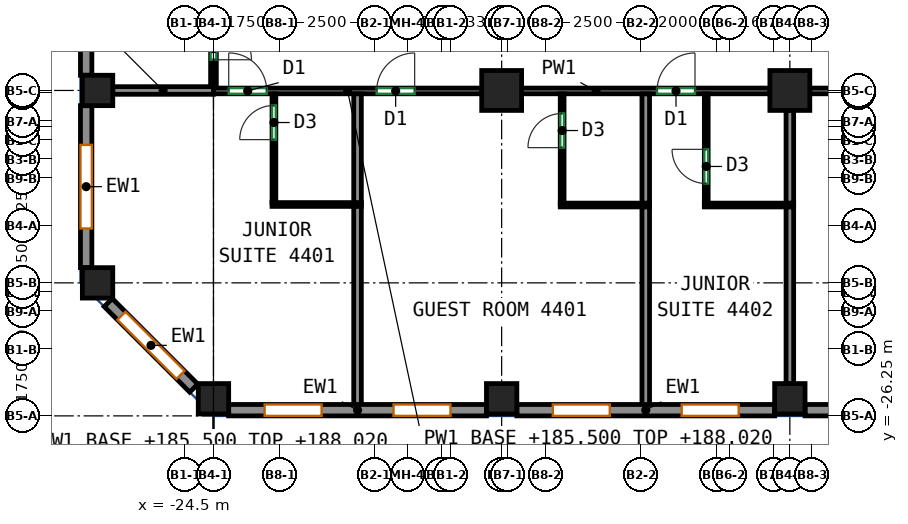
"""IFC4 building model, lengths in metres.
Left out: names, types, materials, properties, quantities, classifications, styles, units other than length and angle.
Written with IfcOpenShell. Run it as: python <this file> out.ifc"""

import sys

from ifc_helpers import new_model, si_unit, direction, frame, frame_2d, origin, origin_2d, place, context, subcontext, project, spatial, rectangle, extrude, source, transform, mapped, element, fill, save


model = new_model("IFC4")
c1 = context("Model", 3, precision=1e-05, world=origin(), true_north=direction((0.0, 1.0)))
c2 = subcontext(c1, "Body", "Model", "MODEL_VIEW")
j1 = project(units=[si_unit("LENGTHUNIT", "METRE"), si_unit("PLANEANGLEUNIT", "RADIAN")], contexts=[c1])
p1 = place(None, origin())
s1 = spatial("IfcSite", under=j1, at=p1, CompositionType="ELEMENT")
p2 = place(p1, origin())
s2 = spatial("IfcBuilding", under=s1, at=p2, CompositionType="ELEMENT")
p3 = place(p2, frame((0.0, 0.0, 185.5)))
s3 = spatial("IfcBuildingStorey", under=s2, at=p3, CompositionType="ELEMENT", Elevation=185.5)
m1 = source(origin(), c2, "Body", "SweptSolid", [
    extrude(rectangle(XDim=0.8, YDim=0.8, at=origin_2d()), origin(), (0.0, 0.0, 1.0), 3.12),
])
for number, where, z_axis, x_axis in (
    (1, (-26.8, -22.75, 0.0), (0.0, 0.0, 1.0), (1.0, 0.0, 0.0)),
    (2, (-26.8, -17.688, 0.0), (0.0, 0.0, 1.0), (1.0, 0.0, 0.0)),
    (3, (-23.75, -25.8, 0.0), (0.0, 0.0, 1.0), (1.0, 0.0, 0.0)),
    (4, (-16.167, -25.8, 0.0), (0.0, 0.0, 1.0), (1.0, 0.0, 0.0)),
):
    element("IfcColumn", number, at=place(p3, frame(where, z_axis=z_axis, x_axis=x_axis)), inside=s3, PredefinedType="COLUMN", context=c2, shape_type="MappedRepresentation", body=[
        mapped(m1, transform((0.0, 0.0, 0.0))),
    ])
m2 = source(origin(), c2, "Body", "SweptSolid", [
    extrude(rectangle(XDim=1.05, YDim=1.05, at=origin_2d()), origin(), (0.0, 0.0, 1.0), 3.12),
])
p4 = place(p3, frame((-16.167, -17.688, 0.0), z_axis=(0.0, 0.0, 1.0), x_axis=(1.0, 0.0, 0.0)))
e5 = element("IfcColumn", 5, at=p4, inside=s3, PredefinedType="COLUMN", context=c2, shape_type="MappedRepresentation", body=[
    mapped(m2, transform((0.0, 0.0, 0.0))),
])
p5 = place(p3, frame((-8.583, -25.8, 0.0), z_axis=(0.0, 0.0, 1.0), x_axis=(1.0, 0.0, 0.0)))
e6 = element("IfcColumn", 6, at=p5, inside=s3, PredefinedType="COLUMN", context=c2, shape_type="MappedRepresentation", body=[
    mapped(m1, transform((0.0, 0.0, 0.0))),
])
p6 = place(p3, frame((-8.583, -17.688, 0.0), z_axis=(0.0, 0.0, 1.0), x_axis=(1.0, 0.0, 0.0)))
e7 = element("IfcColumn", 7, at=p6, inside=s3, PredefinedType="COLUMN", context=c2, shape_type="MappedRepresentation", body=[
    mapped(m2, transform((0.0, 0.0, 0.0))),
])
m3 = source(origin(), c2, "Body", "SweptSolid", [
    extrude(rectangle(XDim=6.783, YDim=0.3, at=frame_2d((3.392, 0.0))), origin(), (0.0, 0.0, 1.0), 3.12),
])
p7 = place(p3, frame((-23.35, -26.1, 0.0), z_axis=(0.0, 0.0, 1.0), x_axis=(1.0, 0.0, 0.0)))
e8 = element("IfcWall", 8, at=p7, inside=s3, PredefinedType="SOLIDWALL", context=c2, shape_type="MappedRepresentation", body=[
    mapped(m3, transform((0.0, 0.0, 0.0))),
])
p8 = place(p7, frame((0.946, 0.0, 0.85)))
e9 = element("IfcOpeningElement", 9, at=p8, cuts=e8, PredefinedType="OPENING", context=c2, shape_type="SweptSolid", body=[
    extrude(rectangle(XDim=1.5, YDim=1.95, at=frame_2d((0.75, 0.975))), frame((0.0, 0.16, 0.0), z_axis=(0.0, -1.0, 0.0), x_axis=(1.0, 0.0, 0.0)), (0.0, 0.0, 1.0), 0.32),
])
p9 = place(p7, frame((4.337, 0.0, 0.85)))
e10 = element("IfcOpeningElement", 10, at=p9, cuts=e8, PredefinedType="OPENING", context=c2, shape_type="SweptSolid", body=[
    extrude(rectangle(XDim=1.5, YDim=1.95, at=frame_2d((0.75, 0.975))), frame((0.0, 0.16, 0.0), z_axis=(0.0, -1.0, 0.0), x_axis=(1.0, 0.0, 0.0)), (0.0, 0.0, 1.0), 0.32),
])
m4 = source(origin(), c2, "Body", "SweptSolid", [
    extrude(rectangle(XDim=6.783, YDim=0.3, at=frame_2d((3.392, 0.0))), origin(), (0.0, 0.0, 1.0), 3.12),
])
p10 = place(p3, frame((-15.767, -26.1, 0.0), z_axis=(0.0, 0.0, 1.0), x_axis=(1.0, 0.0, 0.0)))
e11 = element("IfcWall", 11, at=p10, inside=s3, PredefinedType="SOLIDWALL", context=c2, shape_type="MappedRepresentation", body=[
    mapped(m4, transform((0.0, 0.0, 0.0))),
])
p11 = place(p10, frame((0.946, 0.0, 0.85)))
e12 = element("IfcOpeningElement", 12, at=p11, cuts=e11, PredefinedType="OPENING", context=c2, shape_type="SweptSolid", body=[
    extrude(rectangle(XDim=1.5, YDim=1.95, at=frame_2d((0.75, 0.975))), frame((0.0, 0.16, 0.0), z_axis=(0.0, -1.0, 0.0), x_axis=(1.0, 0.0, 0.0)), (0.0, 0.0, 1.0), 0.32),
])
p12 = place(p10, frame((4.338, 0.0, 0.85)))
e13 = element("IfcOpeningElement", 13, at=p12, cuts=e11, PredefinedType="OPENING", context=c2, shape_type="SweptSolid", body=[
    extrude(rectangle(XDim=1.5, YDim=1.95, at=frame_2d((0.75, 0.975))), frame((0.0, 0.16, 0.0), z_axis=(0.0, -1.0, 0.0), x_axis=(1.0, 0.0, 0.0)), (0.0, 0.0, 1.0), 0.32),
])
p13 = place(p3, frame((-8.183, -26.1, 0.0), z_axis=(0.0, 0.0, 1.0), x_axis=(1.0, 0.0, 0.0)))
e14 = element("IfcWall", 14, at=p13, inside=s3, PredefinedType="SOLIDWALL", context=c2, shape_type="MappedRepresentation", body=[
    mapped(m3, transform((0.0, 0.0, 0.0))),
])
p14 = place(p13, frame((0.946, 0.0, 0.85)))
e15 = element("IfcOpeningElement", 15, at=p14, cuts=e14, PredefinedType="OPENING", context=c2, shape_type="SweptSolid", body=[
    extrude(rectangle(XDim=1.5, YDim=1.95, at=frame_2d((0.75, 0.975))), frame((0.0, 0.16, 0.0), z_axis=(0.0, -1.0, 0.0), x_axis=(1.0, 0.0, 0.0)), (0.0, 0.0, 1.0), 0.32),
])
p15 = place(p13, frame((4.337, 0.0, 0.85)))
e16 = element("IfcOpeningElement", 16, at=p15, cuts=e14, PredefinedType="OPENING", context=c2, shape_type="SweptSolid", body=[
    extrude(rectangle(XDim=1.5, YDim=1.95, at=frame_2d((0.75, 0.975))), frame((0.0, 0.16, 0.0), z_axis=(0.0, -1.0, 0.0), x_axis=(1.0, 0.0, 0.0)), (0.0, 0.0, 1.0), 0.32),
])
m5 = source(origin(), c2, "Body", "SweptSolid", [
    extrude(rectangle(XDim=7.763, YDim=0.3, at=frame_2d((3.881, 0.0))), origin(), (0.0, 0.0, 1.0), 3.12),
])
p16 = place(p3, frame((-27.1, -9.525, 0.0), z_axis=(0.0, 0.0, 1.0), x_axis=(0.0, -1.0, 0.0)))
e17 = element("IfcWall", 17, at=p16, inside=s3, PredefinedType="SOLIDWALL", context=c2, shape_type="MappedRepresentation", body=[
    mapped(m5, transform((0.0, 0.0, 0.0))),
])
p17 = place(p16, frame((0.841, 0.0, 0.85)))
e18 = element("IfcOpeningElement", 18, at=p17, cuts=e17, PredefinedType="OPENING", context=c2, shape_type="SweptSolid", body=[
    extrude(rectangle(XDim=2.2, YDim=1.95, at=frame_2d((1.1, 0.975))), frame((0.0, 0.16, 0.0), z_axis=(0.0, -1.0, 0.0), x_axis=(1.0, 0.0, 0.0)), (0.0, 0.0, 1.0), 0.32),
])
p18 = place(p16, frame((4.722, 0.0, 0.85)))
e19 = element("IfcOpeningElement", 19, at=p18, cuts=e17, PredefinedType="OPENING", context=c2, shape_type="SweptSolid", body=[
    extrude(rectangle(XDim=2.2, YDim=1.95, at=frame_2d((1.1, 0.975))), frame((0.0, 0.16, 0.0), z_axis=(0.0, -1.0, 0.0), x_axis=(1.0, 0.0, 0.0)), (0.0, 0.0, 1.0), 0.32),
])
m6 = source(origin(), c2, "Body", "SweptSolid", [
    extrude(rectangle(XDim=4.263, YDim=0.3, at=frame_2d((2.131, 0.0))), origin(), (0.0, 0.0, 1.0), 3.12),
])
p19 = place(p3, frame((-27.1, -18.087, 0.0), z_axis=(0.0, 0.0, 1.0), x_axis=(0.0, -1.0, 0.0)))
e20 = element("IfcWall", 20, at=p19, inside=s3, PredefinedType="SOLIDWALL", context=c2, shape_type="MappedRepresentation", body=[
    mapped(m6, transform((0.0, 0.0, 0.0))),
])
p20 = place(p19, frame((1.031, 0.0, 0.85)))
e21 = element("IfcOpeningElement", 21, at=p20, cuts=e20, PredefinedType="OPENING", context=c2, shape_type="SweptSolid", body=[
    extrude(rectangle(XDim=2.2, YDim=1.95, at=frame_2d((1.1, 0.975))), frame((0.0, 0.16, 0.0), z_axis=(0.0, -1.0, 0.0), x_axis=(1.0, 0.0, 0.0)), (0.0, 0.0, 1.0), 0.32),
])
m7 = source(origin(), c2, "Body", "SweptSolid", [
    extrude(rectangle(XDim=3.182, YDim=0.3, at=frame_2d((1.591, 0.0))), origin(), (0.0, 0.0, 1.0), 3.12),
])
p21 = place(p3, frame((-26.519, -23.269, 0.0), z_axis=(0.0, 0.0, 1.0), x_axis=(0.707068419229, -0.707145141063, 0.0)))
e22 = element("IfcWall", 22, at=p21, inside=s3, PredefinedType="SOLIDWALL", context=c2, shape_type="MappedRepresentation", body=[
    mapped(m7, transform((0.0, 0.0, 0.0))),
])
p22 = place(p21, frame((0.491, 0.0, 0.85)))
e23 = element("IfcOpeningElement", 23, at=p22, cuts=e22, PredefinedType="OPENING", context=c2, shape_type="SweptSolid", body=[
    extrude(rectangle(XDim=2.2, YDim=1.95, at=frame_2d((1.1, 0.975))), frame((0.0, 0.16, 0.0), z_axis=(0.0, -1.0, 0.0), x_axis=(1.0, 0.0, 0.0)), (0.0, 0.0, 1.0), 0.32),
])
p23 = place(p3, frame((-23.75, -17.7, 0.0), z_axis=(0.0, 0.0, 1.0), x_axis=(1.0, 0.0, 0.0)))
e24 = element("IfcWall", 24, at=p23, inside=s3, PredefinedType="PARTITIONING", context=c2, shape_type="SweptSolid", body=[
    extrude(rectangle(XDim=7.058, YDim=0.15, at=frame_2d((3.529, 0.0))), origin(), (0.0, 0.0, 1.0), 2.52),
])
p24 = place(p23, frame((0.401, 0.0, 0.0)))
e25 = element("IfcOpeningElement", 25, at=p24, cuts=e24, PredefinedType="OPENING", context=c2, shape_type="SweptSolid", body=[
    extrude(rectangle(XDim=1.0, YDim=2.1, at=frame_2d((0.5, 1.05))), frame((0.0, 0.085, 0.0), z_axis=(0.0, -1.0, 0.0), x_axis=(1.0, 0.0, 0.0)), (0.0, 0.0, 1.0), 0.17),
])
p25 = place(p23, frame((4.294, 0.0, 0.0)))
e26 = element("IfcOpeningElement", 26, at=p25, cuts=e24, PredefinedType="OPENING", context=c2, shape_type="SweptSolid", body=[
    extrude(rectangle(XDim=1.0, YDim=2.1, at=frame_2d((0.5, 1.05))), frame((0.0, 0.085, 0.0), z_axis=(0.0, -1.0, 0.0), x_axis=(1.0, 0.0, 0.0)), (0.0, 0.0, 1.0), 0.17),
])
p26 = place(p3, frame((-15.642, -17.7, 0.0), z_axis=(0.0, 0.0, 1.0), x_axis=(1.0, 0.0, 0.0)))
e27 = element("IfcWall", 27, at=p26, inside=s3, PredefinedType="PARTITIONING", context=c2, shape_type="SweptSolid", body=[
    extrude(rectangle(XDim=6.534, YDim=0.15, at=frame_2d((3.267, 0.0))), origin(), (0.0, 0.0, 1.0), 3.12),
])
p27 = place(p26, frame((3.563, 0.0, 0.0)))
e28 = element("IfcOpeningElement", 28, at=p27, cuts=e27, PredefinedType="OPENING", context=c2, shape_type="SweptSolid", body=[
    extrude(rectangle(XDim=1.0, YDim=2.1, at=frame_2d((0.5, 1.05))), frame((0.0, 0.085, 0.0), z_axis=(0.0, -1.0, 0.0), x_axis=(1.0, 0.0, 0.0)), (0.0, 0.0, 1.0), 0.17),
])
p28 = place(p3, frame((-8.058, -17.7, 0.0), z_axis=(0.0, 0.0, 1.0), x_axis=(1.0, 0.0, 0.0)))
e29 = element("IfcWall", 29, at=p28, inside=s3, PredefinedType="PARTITIONING", context=c2, shape_type="SweptSolid", body=[
    extrude(rectangle(XDim=6.533, YDim=0.15, at=frame_2d((3.267, 0.0))), origin(), (0.0, 0.0, 1.0), 3.12),
])
p29 = place(p28, frame((3.26, 0.0, 0.0)))
e30 = element("IfcOpeningElement", 30, at=p29, cuts=e29, PredefinedType="OPENING", context=c2, shape_type="SweptSolid", body=[
    extrude(rectangle(XDim=1.0, YDim=2.1, at=frame_2d((0.5, 1.05))), frame((0.0, 0.085, 0.0), z_axis=(0.0, -1.0, 0.0), x_axis=(1.0, 0.0, 0.0)), (0.0, 0.0, 1.0), 0.17),
])
p30 = place(p3, frame((-23.75, -15.575, 0.0), z_axis=(0.0, 0.0, 1.0), x_axis=(0.0, -1.0, 0.0)))
e31 = element("IfcWall", 31, at=p30, inside=s3, PredefinedType="PARTITIONING", context=c2, shape_type="SweptSolid", body=[
    extrude(rectangle(XDim=2.023, YDim=0.15, at=frame_2d((1.011, 0.0))), origin(), (0.0, 0.0, 1.0), 2.52),
])
p31 = place(p30, frame((0.304, 0.0, 0.0)))
e32 = element("IfcOpeningElement", 32, at=p31, cuts=e31, PredefinedType="OPENING", context=c2, shape_type="SweptSolid", body=[
    extrude(rectangle(XDim=1.0, YDim=2.1, at=frame_2d((0.5, 1.05))), frame((0.0, 0.085, 0.0), z_axis=(0.0, -1.0, 0.0), x_axis=(1.0, 0.0, 0.0)), (0.0, 0.0, 1.0), 0.17),
])
p32 = place(p3, frame((-22.159, -20.638, 0.0), z_axis=(0.0, 0.0, 1.0), x_axis=(0.0, 1.0, 0.0)))
e33 = element("IfcWall", 33, at=p32, inside=s3, PredefinedType="PARTITIONING", context=c2, shape_type="SweptSolid", body=[
    extrude(rectangle(XDim=2.861, YDim=0.1, at=frame_2d((1.43, 0.0))), origin(), (0.0, 0.0, 1.0), 3.12),
])
p33 = place(p32, frame((1.657, 0.0, 0.0)))
e34 = element("IfcOpeningElement", 34, at=p33, cuts=e33, PredefinedType="OPENING", context=c2, shape_type="SweptSolid", body=[
    extrude(rectangle(XDim=0.9, YDim=2.1, at=frame_2d((0.45, 1.05))), frame((0.0, 0.06, 0.0), z_axis=(0.0, -1.0, 0.0), x_axis=(1.0, 0.0, 0.0)), (0.0, 0.0, 1.0), 0.12),
])
p34 = place(p3, frame((-22.209, -20.688, 0.0), z_axis=(0.0, 0.0, 1.0), x_axis=(1.0, 0.0, 0.0)))
e35 = element("IfcWall", 35, at=p34, inside=s3, PredefinedType="PARTITIONING", context=c2, shape_type="SweptSolid", body=[
    extrude(rectangle(XDim=2.35, YDim=0.1, at=frame_2d((1.175, 0.0))), origin(), (0.0, 0.0, 1.0), 3.12),
])
p35 = place(p3, frame((-19.959, -26.0, 0.0), z_axis=(0.0, 0.0, 1.0), x_axis=(0.0, 1.0, 0.0)))
e36 = element("IfcWall", 36, at=p35, inside=s3, PredefinedType="PARTITIONING", context=c2, shape_type="SweptSolid", body=[
    extrude(rectangle(XDim=5.262, YDim=0.2, at=frame_2d((2.631, 0.0))), origin(), (0.0, 0.0, 1.0), 3.12),
])
p36 = place(p3, frame((-26.4, -17.688, 0.0), z_axis=(0.0, 0.0, 1.0), x_axis=(1.0, 0.0, 0.0)))
e37 = element("IfcWall", 37, at=p36, inside=s3, PredefinedType="PARTITIONING", context=c2, shape_type="SweptSolid", body=[
    extrude(rectangle(XDim=2.648, YDim=0.2, at=frame_2d((1.324, 0.0))), origin(), (0.0, 0.0, 1.0), 2.52),
])
p37 = place(p3, frame((-19.959, -20.638, 0.0), z_axis=(0.0, 0.0, 1.0), x_axis=(0.0, 1.0, 0.0)))
e38 = element("IfcWall", 38, at=p37, inside=s3, PredefinedType="PARTITIONING", context=c2, shape_type="SweptSolid", body=[
    extrude(rectangle(XDim=2.861, YDim=0.2, at=frame_2d((1.43, 0.0))), origin(), (0.0, 0.0, 1.0), 3.12),
])
p38 = place(p3, frame((-14.575, -20.652, 0.0), z_axis=(0.0, 0.0, 1.0), x_axis=(0.0, 1.0, 0.0)))
e39 = element("IfcWall", 39, at=p38, inside=s3, PredefinedType="PARTITIONING", context=c2, shape_type="SweptSolid", body=[
    extrude(rectangle(XDim=2.875, YDim=0.1, at=frame_2d((1.438, 0.0))), origin(), (0.0, 0.0, 1.0), 3.12),
])
p39 = place(p38, frame((1.46, 0.0, 0.0)))
e40 = element("IfcOpeningElement", 40, at=p39, cuts=e39, PredefinedType="OPENING", context=c2, shape_type="SweptSolid", body=[
    extrude(rectangle(XDim=0.9, YDim=2.1, at=frame_2d((0.45, 1.05))), frame((0.0, 0.06, 0.0), z_axis=(0.0, -1.0, 0.0), x_axis=(1.0, 0.0, 0.0)), (0.0, 0.0, 1.0), 0.12),
])
p40 = place(p3, frame((-14.625, -20.702, 0.0), z_axis=(0.0, 0.0, 1.0), x_axis=(1.0, 0.0, 0.0)))
e41 = element("IfcWall", 41, at=p40, inside=s3, PredefinedType="PARTITIONING", context=c2, shape_type="SweptSolid", body=[
    extrude(rectangle(XDim=2.35, YDim=0.1, at=frame_2d((1.175, 0.0))), origin(), (0.0, 0.0, 1.0), 3.12),
])
p41 = place(p3, frame((-12.375, -26.0, 0.0), z_axis=(0.0, 0.0, 1.0), x_axis=(0.0, 1.0, 0.0)))
e42 = element("IfcWall", 42, at=p41, inside=s3, PredefinedType="PARTITIONING", context=c2, shape_type="SweptSolid", body=[
    extrude(rectangle(XDim=5.248, YDim=0.2, at=frame_2d((2.624, 0.0))), origin(), (0.0, 0.0, 1.0), 3.12),
])
p42 = place(p3, frame((-12.375, -20.652, 0.0), z_axis=(0.0, 0.0, 1.0), x_axis=(0.0, 1.0, 0.0)))
e43 = element("IfcWall", 43, at=p42, inside=s3, PredefinedType="PARTITIONING", context=c2, shape_type="SweptSolid", body=[
    extrude(rectangle(XDim=2.875, YDim=0.2, at=frame_2d((1.438, 0.0))), origin(), (0.0, 0.0, 1.0), 3.12),
])
p43 = place(p3, frame((-10.783, -20.652, 0.0), z_axis=(0.0, 0.0, 1.0), x_axis=(0.0, 1.0, 0.0)))
e44 = element("IfcWall", 44, at=p43, inside=s3, PredefinedType="PARTITIONING", context=c2, shape_type="SweptSolid", body=[
    extrude(rectangle(XDim=2.875, YDim=0.1, at=frame_2d((1.438, 0.0))), origin(), (0.0, 0.0, 1.0), 3.12),
])
p44 = place(p43, frame((0.515, 0.0, 0.0)))
e45 = element("IfcOpeningElement", 45, at=p44, cuts=e44, PredefinedType="OPENING", context=c2, shape_type="SweptSolid", body=[
    extrude(rectangle(XDim=0.9, YDim=2.1, at=frame_2d((0.45, 1.05))), frame((0.0, 0.06, 0.0), z_axis=(0.0, -1.0, 0.0), x_axis=(1.0, 0.0, 0.0)), (0.0, 0.0, 1.0), 0.12),
])
p45 = place(p3, frame((-10.833, -20.702, 0.0), z_axis=(0.0, 0.0, 1.0), x_axis=(1.0, 0.0, 0.0)))
e46 = element("IfcWall", 46, at=p45, inside=s3, PredefinedType="PARTITIONING", context=c2, shape_type="SweptSolid", body=[
    extrude(rectangle(XDim=2.35, YDim=0.1, at=frame_2d((1.175, 0.0))), origin(), (0.0, 0.0, 1.0), 3.12),
])
p46 = place(p3, frame((-8.583, -25.4, 0.0), z_axis=(0.0, 0.0, 1.0), x_axis=(0.0, 1.0, 0.0)))
e47 = element("IfcWall", 47, at=p46, inside=s3, PredefinedType="PARTITIONING", context=c2, shape_type="SweptSolid", body=[
    extrude(rectangle(XDim=4.648, YDim=0.2, at=frame_2d((2.324, 0.0))), origin(), (0.0, 0.0, 1.0), 3.12),
])
p47 = place(p3, frame((-8.583, -20.652, 0.0), z_axis=(0.0, 0.0, 1.0), x_axis=(0.0, 1.0, 0.0)))
e48 = element("IfcWall", 48, at=p47, inside=s3, PredefinedType="PARTITIONING", context=c2, shape_type="SweptSolid", body=[
    extrude(rectangle(XDim=2.44, YDim=0.2, at=frame_2d((1.22, 0.0))), origin(), (0.0, 0.0, 1.0), 3.12),
])
p48 = place(p8, origin())
e49 = element("IfcWindow", 49, at=p48, inside=s3, PartitioningType="SINGLE_PANEL", PredefinedType="WINDOW", context=c2, shape_type="SweptSolid", body=[
    extrude(rectangle(XDim=1.5, YDim=1.95, at=frame_2d((0.75, 0.975))), frame((0.0, 0.03, 0.0), z_axis=(0.0, -1.0, 0.0), x_axis=(1.0, 0.0, 0.0)), (0.0, 0.0, 1.0), 0.06),
])
fill(e9, e49)
p49 = place(p9, origin())
e50 = element("IfcWindow", 50, at=p49, inside=s3, PartitioningType="SINGLE_PANEL", PredefinedType="WINDOW", context=c2, shape_type="SweptSolid", body=[
    extrude(rectangle(XDim=1.5, YDim=1.95, at=frame_2d((0.75, 0.975))), frame((0.0, 0.03, 0.0), z_axis=(0.0, -1.0, 0.0), x_axis=(1.0, 0.0, 0.0)), (0.0, 0.0, 1.0), 0.06),
])
fill(e10, e50)
p50 = place(p11, origin())
e51 = element("IfcWindow", 51, at=p50, inside=s3, PartitioningType="SINGLE_PANEL", PredefinedType="WINDOW", context=c2, shape_type="SweptSolid", body=[
    extrude(rectangle(XDim=1.5, YDim=1.95, at=frame_2d((0.75, 0.975))), frame((0.0, 0.03, 0.0), z_axis=(0.0, -1.0, 0.0), x_axis=(1.0, 0.0, 0.0)), (0.0, 0.0, 1.0), 0.06),
])
fill(e12, e51)
p51 = place(p12, origin())
e52 = element("IfcWindow", 52, at=p51, inside=s3, PartitioningType="SINGLE_PANEL", PredefinedType="WINDOW", context=c2, shape_type="SweptSolid", body=[
    extrude(rectangle(XDim=1.5, YDim=1.95, at=frame_2d((0.75, 0.975))), frame((0.0, 0.03, 0.0), z_axis=(0.0, -1.0, 0.0), x_axis=(1.0, 0.0, 0.0)), (0.0, 0.0, 1.0), 0.06),
])
fill(e13, e52)
p52 = place(p20, origin())
e53 = element("IfcWindow", 53, at=p52, inside=s3, PartitioningType="SINGLE_PANEL", PredefinedType="WINDOW", context=c2, shape_type="SweptSolid", body=[
    extrude(rectangle(XDim=2.2, YDim=1.95, at=frame_2d((1.1, 0.975))), frame((0.0, 0.03, 0.0), z_axis=(0.0, -1.0, 0.0), x_axis=(1.0, 0.0, 0.0)), (0.0, 0.0, 1.0), 0.06),
])
fill(e21, e53)
p53 = place(p22, origin())
e54 = element("IfcWindow", 54, at=p53, inside=s3, PartitioningType="SINGLE_PANEL", PredefinedType="WINDOW", context=c2, shape_type="SweptSolid", body=[
    extrude(rectangle(XDim=2.2, YDim=1.95, at=frame_2d((1.1, 0.975))), frame((0.0, 0.03, 0.0), z_axis=(0.0, -1.0, 0.0), x_axis=(1.0, 0.0, 0.0)), (0.0, 0.0, 1.0), 0.06),
])
fill(e23, e54)
p54 = place(p44, origin())
e55 = element("IfcDoor", 55, at=p54, inside=s3, OperationType="SINGLE_SWING_RIGHT", PredefinedType="DOOR", context=c2, shape_type="SweptSolid", body=[
    extrude(rectangle(XDim=0.9, YDim=2.1, at=frame_2d((0.45, 1.05))), frame((0.0, 0.025, 0.0), z_axis=(0.0, -1.0, 0.0), x_axis=(1.0, 0.0, 0.0)), (0.0, 0.0, 1.0), 0.05),
])
fill(e45, e55)
p55 = place(p39, origin())
e56 = element("IfcDoor", 56, at=p55, inside=s3, OperationType="SINGLE_SWING_LEFT", PredefinedType="DOOR", context=c2, shape_type="SweptSolid", body=[
    extrude(rectangle(XDim=0.9, YDim=2.1, at=frame_2d((0.45, 1.05))), frame((0.0, 0.025, 0.0), z_axis=(0.0, -1.0, 0.0), x_axis=(1.0, 0.0, 0.0)), (0.0, 0.0, 1.0), 0.05),
])
fill(e40, e56)
p56 = place(p33, origin())
e57 = element("IfcDoor", 57, at=p56, inside=s3, OperationType="SINGLE_SWING_LEFT", PredefinedType="DOOR", context=c2, shape_type="SweptSolid", body=[
    extrude(rectangle(XDim=0.9, YDim=2.1, at=frame_2d((0.45, 1.05))), frame((0.0, 0.025, 0.0), z_axis=(0.0, -1.0, 0.0), x_axis=(1.0, 0.0, 0.0)), (0.0, 0.0, 1.0), 0.05),
])
fill(e34, e57)
p57 = place(p24, origin())
e58 = element("IfcDoor", 58, at=p57, inside=s3, OperationType="SINGLE_SWING_LEFT", PredefinedType="DOOR", context=c2, shape_type="SweptSolid", body=[
    extrude(rectangle(XDim=1.0, YDim=2.1, at=frame_2d((0.5, 1.05))), frame((0.0, 0.025, 0.0), z_axis=(0.0, -1.0, 0.0), x_axis=(1.0, 0.0, 0.0)), (0.0, 0.0, 1.0), 0.05),
])
fill(e25, e58)
p58 = place(p25, origin())
e59 = element("IfcDoor", 59, at=p58, inside=s3, OperationType="SINGLE_SWING_RIGHT", PredefinedType="DOOR", context=c2, shape_type="SweptSolid", body=[
    extrude(rectangle(XDim=1.0, YDim=2.1, at=frame_2d((0.5, 1.05))), frame((0.0, 0.025, 0.0), z_axis=(0.0, -1.0, 0.0), x_axis=(1.0, 0.0, 0.0)), (0.0, 0.0, 1.0), 0.05),
])
fill(e26, e59)
p59 = place(p27, origin())
e60 = element("IfcDoor", 60, at=p59, inside=s3, OperationType="SINGLE_SWING_RIGHT", PredefinedType="DOOR", context=c2, shape_type="SweptSolid", body=[
    extrude(rectangle(XDim=1.0, YDim=2.1, at=frame_2d((0.5, 1.05))), frame((0.0, 0.025, 0.0), z_axis=(0.0, -1.0, 0.0), x_axis=(1.0, 0.0, 0.0)), (0.0, 0.0, 1.0), 0.05),
])
fill(e28, e60)
p60 = place(p31, origin())
e61 = element("IfcDoor", 61, at=p60, inside=s3, OperationType="SINGLE_SWING_RIGHT", PredefinedType="DOOR", context=c2, shape_type="SweptSolid", body=[
    extrude(rectangle(XDim=1.0, YDim=2.1, at=frame_2d((0.5, 1.05))), frame((0.0, 0.025, 0.0), z_axis=(0.0, -1.0, 0.0), x_axis=(1.0, 0.0, 0.0)), (0.0, 0.0, 1.0), 0.05),
])
fill(e32, e61)
save(model, sys.argv[1])
